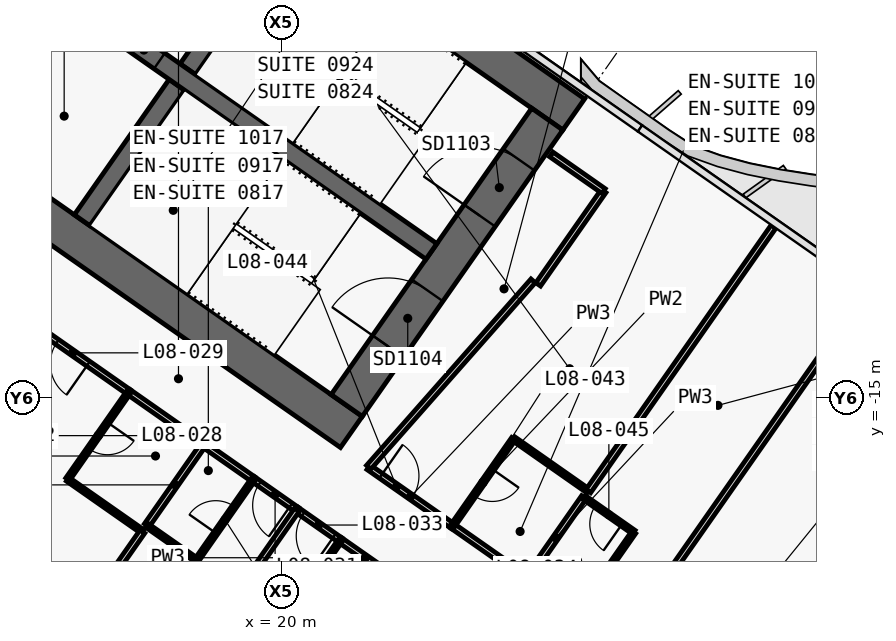
"""IFC4 building model, lengths in metres.
Left out: names, types, materials, properties, quantities, classifications, styles, units other than length and angle.
Written with IfcOpenShell. Run it as: python <this file> out.ifc"""

import sys

from ifc_helpers import new_model, si_unit, direction, frame, frame_2d, origin, place, context, subcontext, project, spatial, polyline, rectangle, outline, extrude, element, fill, save


model = new_model("IFC4")
c1 = context("Model", 3, precision=1e-05, world=origin(), true_north=direction((0.0, 1.0)))
c2 = subcontext(c1, "Body", "Model", "MODEL_VIEW")
j1 = project(units=[si_unit("LENGTHUNIT", "METRE"), si_unit("PLANEANGLEUNIT", "RADIAN")], contexts=[c1])
p1 = place(None, origin())
s1 = spatial("IfcSite", under=j1, at=p1, CompositionType="ELEMENT")
p2 = place(p1, origin())
s2 = spatial("IfcBuilding", under=s1, at=p2, CompositionType="ELEMENT")
p3 = place(p2, frame((0.0, 0.0, 54.5)))
s3 = spatial("IfcBuildingStorey", under=s2, at=p3, CompositionType="ELEMENT", Elevation=54.5)
p4 = place(p3, frame((-0.037, 11.867, 0.0), z_axis=(0.0, 0.0, 1.0), x_axis=(0.819155306259, -0.573571777746, 0.0)))
e1 = element("IfcWall", 1, at=p4, inside=s3, PredefinedType="SHEAR", context=c2, shape_type="SweptSolid", body=[
    extrude(outline(polyline([(33.837, 0.5), (0.0, 0.5), (0.7, -0.5), (33.837, -0.5), (33.837, 0.5)])), origin(), (0.0, 0.0, 1.0), 3.6),
])
p5 = place(p3, frame((-0.037, -0.585, 0.0), z_axis=(0.0, 0.0, 1.0), x_axis=(0.819157152511, -0.573569140985, 0.0)))
e2 = element("IfcWall", 2, at=p5, inside=s3, PredefinedType="SHEAR", context=c2, shape_type="SweptSolid", body=[
    extrude(outline(polyline([(26.695, 0.5), (0.0, 0.5), (0.7, -0.5), (26.695, -0.5), (26.695, 0.5)])), origin(), (0.0, 0.0, 1.0), 3.6),
])
p6 = place(p5, frame((6.695, 0.0, 0.0)))
e3 = element("IfcOpeningElement", 3, at=p6, cuts=e2, PredefinedType="OPENING", context=c2, shape_type="SweptSolid", body=[
    extrude(rectangle(XDim=1.5, YDim=2.1, at=frame_2d((0.75, 1.05))), frame((0.0, 0.51, 0.0), z_axis=(0.0, -1.0, 0.0), x_axis=(1.0, 0.0, 0.0)), (0.0, 0.0, 1.0), 1.02),
])
p7 = place(p5, frame((12.445, 0.0, 0.0)))
e4 = element("IfcOpeningElement", 4, at=p7, cuts=e2, PredefinedType="OPENING", context=c2, shape_type="SweptSolid", body=[
    extrude(rectangle(XDim=1.5, YDim=2.1, at=frame_2d((0.75, 1.05))), frame((0.0, 0.51, 0.0), z_axis=(0.0, -1.0, 0.0), x_axis=(1.0, 0.0, 0.0)), (0.0, 0.0, 1.0), 1.02),
])
p8 = place(p3, frame((21.708, -15.2, 0.0), z_axis=(0.0, 0.0, 1.0), x_axis=(0.573576324356, 0.819152122709, 0.0)))
e5 = element("IfcWall", 5, at=p8, inside=s3, PredefinedType="SHEAR", context=c2, shape_type="SweptSolid", body=[
    extrude(outline(polyline([(9.2, 0.5), (0.0, 0.5), (0.0, -0.5), (9.2, -0.5), (9.2, 0.5)])), origin(), (0.0, 0.0, 1.0), 3.6),
])
p9 = place(p8, frame((6.1, 0.0, 0.0)))
e6 = element("IfcOpeningElement", 6, at=p9, cuts=e5, PredefinedType="OPENING", context=c2, shape_type="SweptSolid", body=[
    extrude(rectangle(XDim=1.8, YDim=2.1, at=frame_2d((0.9, 1.05))), frame((0.0, 0.51, 0.0), z_axis=(0.0, -1.0, 0.0), x_axis=(1.0, 0.0, 0.0)), (0.0, 0.0, 1.0), 1.02),
])
p10 = place(p8, frame((1.9, 0.0, 0.0)))
e7 = element("IfcOpeningElement", 7, at=p10, cuts=e5, PredefinedType="OPENING", context=c2, shape_type="SweptSolid", body=[
    extrude(rectangle(XDim=1.8, YDim=2.1, at=frame_2d((0.9, 1.05))), frame((0.0, 0.51, 0.0), z_axis=(0.0, -1.0, 0.0), x_axis=(1.0, 0.0, 0.0)), (0.0, 0.0, 1.0), 1.02),
])
p11 = place(p3, frame((14.745, -10.324, 0.0), z_axis=(0.0, 0.0, 1.0), x_axis=(0.57356780395, 0.819158088694, 0.0)))
e8 = element("IfcWall", 8, at=p11, inside=s3, PredefinedType="SHEAR", context=c2, shape_type="SweptSolid", body=[
    extrude(outline(polyline([(0.0, 0.25), (0.0, -0.25), (4.35, -0.25), (4.35, 0.25), (0.0, 0.25)])), origin(), (0.0, 0.0, 1.0), 3.6),
])
p12 = place(p3, frame((17.527, -6.352, 0.0), z_axis=(0.0, 0.0, 1.0), x_axis=(0.573530143085, 0.819184457233, 0.0)))
e9 = element("IfcWall", 9, at=p12, inside=s3, PredefinedType="SHEAR", context=c2, shape_type="SweptSolid", body=[
    extrude(outline(polyline([(4.35, -0.25), (4.35, 0.25), (0.0, 0.25), (0.0, -0.25), (4.35, -0.25)])), origin(), (0.0, 0.0, 1.0), 3.6),
])
p13 = place(p3, frame((2.638, 3.768, 0.0), z_axis=(0.0, 0.0, 1.0), x_axis=(0.819148977158, -0.573580816643, 0.0)))
e10 = element("IfcWall", 10, at=p13, inside=s3, PredefinedType="SHEAR", context=c2, shape_type="SweptSolid", body=[
    extrude(outline(polyline([(0.0, 0.25), (0.0, -0.25), (26.0, -0.25), (26.0, 0.25), (0.0, 0.25)])), origin(), (0.0, 0.0, 1.0), 3.6),
])
p14 = place(p13, frame((9.637, 0.0, 0.0)))
e11 = element("IfcOpeningElement", 11, at=p14, cuts=e10, PredefinedType="OPENING", context=c2, shape_type="SweptSolid", body=[
    extrude(rectangle(XDim=1.2, YDim=2.1, at=frame_2d((0.6, 1.05))), frame((0.0, 0.26, 0.0), z_axis=(0.0, -1.0, 0.0), x_axis=(1.0, 0.0, 0.0)), (0.0, 0.0, 1.0), 0.52),
])
p15 = place(p13, frame((11.812, 0.0, 0.0)))
e12 = element("IfcOpeningElement", 12, at=p15, cuts=e10, PredefinedType="OPENING", context=c2, shape_type="SweptSolid", body=[
    extrude(rectangle(XDim=1.2, YDim=2.1, at=frame_2d((0.6, 1.05))), frame((0.0, 0.26, 0.0), z_axis=(0.0, -1.0, 0.0), x_axis=(1.0, 0.0, 0.0)), (0.0, 0.0, 1.0), 0.52),
])
p16 = place(p13, frame((13.988, 0.0, 0.0)))
e13 = element("IfcOpeningElement", 13, at=p16, cuts=e10, PredefinedType="OPENING", context=c2, shape_type="SweptSolid", body=[
    extrude(rectangle(XDim=1.2, YDim=2.1, at=frame_2d((0.6, 1.05))), frame((0.0, 0.26, 0.0), z_axis=(0.0, -1.0, 0.0), x_axis=(1.0, 0.0, 0.0)), (0.0, 0.0, 1.0), 0.52),
])
p17 = place(p13, frame((16.262, 0.0, 0.0)))
e14 = element("IfcOpeningElement", 14, at=p17, cuts=e10, PredefinedType="OPENING", context=c2, shape_type="SweptSolid", body=[
    extrude(rectangle(XDim=1.0, YDim=2.1, at=frame_2d((0.5, 1.05))), frame((0.0, 0.26, 0.0), z_axis=(0.0, -1.0, 0.0), x_axis=(1.0, 0.0, 0.0)), (0.0, 0.0, 1.0), 0.52),
])
p18 = place(p3, frame((22.284, -16.824, 0.0), z_axis=(0.0, 0.0, 1.0), x_axis=(0.819176640776, -0.573541307325, 0.0)))
e15 = element("IfcWall", 15, at=p18, inside=s3, PredefinedType="PARTITIONING", context=c2, shape_type="SweptSolid", body=[
    extrude(rectangle(XDim=2.698, YDim=0.15, at=frame_2d((1.349, 0.0))), origin(), (0.0, 0.0, 1.0), 3.32),
])
p19 = place(p18, frame((0.396, 0.0, 0.0)))
e16 = element("IfcOpeningElement", 16, at=p19, cuts=e15, PredefinedType="OPENING", context=c2, shape_type="SweptSolid", body=[
    extrude(rectangle(XDim=1.0, YDim=2.1, at=frame_2d((0.5, 1.05))), frame((0.0, 0.085, 0.0), z_axis=(0.0, -1.0, 0.0), x_axis=(1.0, 0.0, 0.0)), (0.0, 0.0, 1.0), 0.17),
])
p20 = place(p3, frame((24.491, -18.369, 0.0), z_axis=(0.0, 0.0, 1.0), x_axis=(0.819179439794, -0.573537309527, 0.0)))
e17 = element("IfcWall", 17, at=p20, inside=s3, PredefinedType="PARTITIONING", context=c2, shape_type="SweptSolid", body=[
    extrude(rectangle(XDim=2.404, YDim=0.15, at=frame_2d((1.202, 0.0))), origin(), (0.0, 0.0, 1.0), 3.32),
])
p21 = place(p3, frame((15.974, -14.847, 0.0), z_axis=(0.0, 0.0, 1.0), x_axis=(-0.819145961204, 0.573585123798, 0.0)))
e18 = element("IfcWall", 18, at=p21, inside=s3, PredefinedType="PARTITIONING", context=c2, shape_type="SweptSolid", body=[
    extrude(rectangle(XDim=3.603, YDim=0.15, at=frame_2d((1.802, 0.0))), origin(), (0.0, 0.0, 1.0), 2.6),
])
p22 = place(p21, frame((1.301, 0.0, 0.0)))
e19 = element("IfcOpeningElement", 19, at=p22, cuts=e18, PredefinedType="OPENING", context=c2, shape_type="SweptSolid", body=[
    extrude(rectangle(XDim=1.0, YDim=2.1, at=frame_2d((0.5, 1.05))), frame((0.0, 0.085, 0.0), z_axis=(0.0, -1.0, 0.0), x_axis=(1.0, 0.0, 0.0)), (0.0, 0.0, 1.0), 0.17),
])
p23 = place(p3, frame((17.941, -16.224, 0.0), z_axis=(0.0, 0.0, 1.0), x_axis=(-0.81922714955, 0.573469159974, 0.0)))
e20 = element("IfcWall", 20, at=p23, inside=s3, PredefinedType="PARTITIONING", context=c2, shape_type="SweptSolid", body=[
    extrude(rectangle(XDim=2.404, YDim=0.15, at=frame_2d((1.202, 0.0))), origin(), (0.0, 0.0, 1.0), 3.32),
])
p24 = place(p3, frame((20.398, -17.945, 0.0), z_axis=(0.0, 0.0, 1.0), x_axis=(-0.819060210533, 0.573707566205, 0.0)))
e21 = element("IfcWall", 21, at=p24, inside=s3, PredefinedType="PARTITIONING", context=c2, shape_type="SweptSolid", body=[
    extrude(rectangle(XDim=1.403, YDim=0.15, at=frame_2d((0.702, 0.0))), origin(), (0.0, 0.0, 1.0), 2.6),
])
p25 = place(p24, frame((0.202, 0.0, 0.0)))
e22 = element("IfcOpeningElement", 22, at=p25, cuts=e21, PredefinedType="OPENING", context=c2, shape_type="SweptSolid", body=[
    extrude(rectangle(XDim=1.0, YDim=2.1, at=frame_2d((0.5, 1.05))), frame((0.0, 0.085, 0.0), z_axis=(0.0, -1.0, 0.0), x_axis=(1.0, 0.0, 0.0)), (0.0, 0.0, 1.0), 0.17),
])
p26 = place(p3, frame((19.251, -17.142, 0.0), z_axis=(0.0, 0.0, 1.0), x_axis=(-0.819189013667, 0.573523634986, 0.0)))
e23 = element("IfcWall", 23, at=p26, inside=s3, PredefinedType="PARTITIONING", context=c2, shape_type="SweptSolid", body=[
    extrude(rectangle(XDim=1.604, YDim=0.15, at=frame_2d((0.802, 0.0))), origin(), (0.0, 0.0, 1.0), 3.32),
])
p27 = place(p3, frame((21.544, -18.748, 0.0), z_axis=(0.0, 0.0, 1.0), x_axis=(-0.81914197737, 0.573590813132, 0.0)))
e24 = element("IfcWall", 24, at=p27, inside=s3, PredefinedType="PARTITIONING", context=c2, shape_type="SweptSolid", body=[
    extrude(rectangle(XDim=1.403, YDim=0.15, at=frame_2d((0.701, 0.0))), origin(), (0.0, 0.0, 1.0), 2.6),
])
p28 = place(p27, frame((0.201, 0.0, 0.0)))
e25 = element("IfcOpeningElement", 25, at=p28, cuts=e24, PredefinedType="OPENING", context=c2, shape_type="SweptSolid", body=[
    extrude(rectangle(XDim=1.0, YDim=2.1, at=frame_2d((0.5, 1.05))), frame((0.0, 0.085, 0.0), z_axis=(0.0, -1.0, 0.0), x_axis=(1.0, 0.0, 0.0)), (0.0, 0.0, 1.0), 0.17),
])
p29 = place(p3, frame((22.855, -19.666, 0.0), z_axis=(0.0, 0.0, 1.0), x_axis=(-0.819117502046, 0.573625764625, 0.0)))
e26 = element("IfcWall", 26, at=p29, inside=s3, PredefinedType="PARTITIONING", context=c2, shape_type="SweptSolid", body=[
    extrude(rectangle(XDim=1.604, YDim=0.15, at=frame_2d((0.802, 0.0))), origin(), (0.0, 0.0, 1.0), 3.32),
])
p30 = place(p3, frame((26.098, -16.076, 0.0), z_axis=(0.0, 0.0, 1.0), x_axis=(-0.573550118428, -0.819170471667, 0.0)))
e27 = element("IfcWall", 27, at=p30, inside=s3, PredefinedType="PARTITIONING", context=c2, shape_type="SweptSolid", body=[
    extrude(rectangle(XDim=2.8, YDim=0.12, at=frame_2d((1.4, 0.0))), origin(), (0.0, 0.0, 1.0), 2.6),
])
p31 = place(p30, frame((0.975, 0.0, 0.0)))
e28 = element("IfcOpeningElement", 28, at=p31, cuts=e27, PredefinedType="OPENING", context=c2, shape_type="SweptSolid", body=[
    extrude(rectangle(XDim=0.85, YDim=2.05, at=frame_2d((0.425, 1.025))), frame((0.0, 0.07, 0.0), z_axis=(0.0, -1.0, 0.0), x_axis=(1.0, 0.0, 0.0)), (0.0, 0.0, 1.0), 0.14),
])
p32 = place(p3, frame((28.065, -17.453, 0.0), z_axis=(0.0, 0.0, 1.0), x_axis=(-0.819155442668, 0.573571582932, 0.0)))
e29 = element("IfcWall", 29, at=p32, inside=s3, PredefinedType="PARTITIONING", context=c2, shape_type="SweptSolid", body=[
    extrude(rectangle(XDim=2.4, YDim=0.12, at=frame_2d((1.2, 0.0))), origin(), (0.0, 0.0, 1.0), 3.32),
])
p33 = place(p3, frame((32.94, -10.491, 0.0), z_axis=(0.0, 0.0, 1.0), x_axis=(-0.573593433868, -0.819140142237, 0.0)))
e30 = element("IfcWall", 30, at=p33, inside=s3, PredefinedType="PARTITIONING", context=c2, shape_type="SweptSolid", body=[
    extrude(rectangle(XDim=8.499, YDim=0.15, at=frame_2d((4.25, 0.0))), origin(), (0.0, 0.0, 1.0), 2.6),
])
p34 = place(p3, frame((22.285, -16.825, 0.0), z_axis=(0.0, 0.0, 1.0), x_axis=(0.661551268245, 0.749899939647, 0.0)))
e31 = element("IfcWall", 31, at=p34, inside=s3, PredefinedType="PARTITIONING", context=c2, shape_type="SweptSolid", body=[
    extrude(rectangle(XDim=6.541, YDim=0.15, at=frame_2d((3.271, 0.0))), origin(), (0.0, 0.0, 1.0), 2.6),
])
p35 = place(p3, frame((26.746, -12.014, 0.0), z_axis=(0.0, 0.0, 1.0), x_axis=(0.573560650686, 0.819163097304, 0.0)))
e32 = element("IfcWall", 32, at=p35, inside=s3, PredefinedType="PARTITIONING", context=c2, shape_type="SweptSolid", body=[
    extrude(rectangle(XDim=3.0, YDim=0.15, at=frame_2d((1.5, 0.0))), origin(), (0.0, 0.0, 1.0), 3.32),
])
p36 = place(p3, frame((28.467, -9.556, 0.0), z_axis=(0.0, 0.0, 1.0), x_axis=(-0.819109000826, 0.573637903879, 0.0)))
e33 = element("IfcWall", 33, at=p36, inside=s3, PredefinedType="PARTITIONING", context=c2, shape_type="SweptSolid", body=[
    extrude(rectangle(XDim=1.68, YDim=0.15, at=frame_2d((0.84, 0.0))), origin(), (0.0, 0.0, 1.0), 3.32),
])
p37 = place(p3, frame((27.951, -17.616, 0.0), z_axis=(0.0, 0.0, 1.0), x_axis=(-0.573544201094, -0.819174614714, 0.0)))
e34 = element("IfcWall", 34, at=p37, inside=s3, PredefinedType="PARTITIONING", context=c2, shape_type="SweptSolid", body=[
    extrude(rectangle(XDim=2.602, YDim=0.15, at=frame_2d((1.301, 0.0))), origin(), (0.0, 0.0, 1.0), 2.6),
])
p38 = place(p3, frame((27.77, -20.666, 0.0), z_axis=(0.0, 0.0, 1.0), x_axis=(0.573537965655, 0.819178980414, 0.0)))
e35 = element("IfcWall", 35, at=p38, inside=s3, PredefinedType="PARTITIONING", context=c2, shape_type="SweptSolid", body=[
    extrude(rectangle(XDim=2.6, YDim=0.12, at=frame_2d((1.3, 0.0))), origin(), (0.0, 0.0, 1.0), 2.6),
])
p39 = place(p3, frame((29.261, -18.534, 0.0), z_axis=(0.0, 0.0, 1.0), x_axis=(-0.819253425856, 0.573431621227, 0.0)))
e36 = element("IfcWall", 36, at=p39, inside=s3, PredefinedType="PARTITIONING", context=c2, shape_type="SweptSolid", body=[
    extrude(rectangle(XDim=1.6, YDim=0.12, at=frame_2d((0.8, 0.0))), origin(), (0.0, 0.0, 1.0), 3.32),
])
p40 = place(p39, frame((0.375, 0.0, 0.0)))
e37 = element("IfcOpeningElement", 37, at=p40, cuts=e36, PredefinedType="OPENING", context=c2, shape_type="SweptSolid", body=[
    extrude(rectangle(XDim=0.85, YDim=2.05, at=frame_2d((0.425, 1.025))), frame((0.0, 0.07, 0.0), z_axis=(0.0, -1.0, 0.0), x_axis=(1.0, 0.0, 0.0)), (0.0, 0.0, 1.0), 0.14),
])
p41 = place(p3, frame((35.013, -12.76, 0.0), z_axis=(0.0, 0.0, 1.0), x_axis=(-0.573558725113, -0.819164445546, 0.0)))
e38 = element("IfcWall", 38, at=p41, inside=s3, PredefinedType="PARTITIONING", context=c2, shape_type="SweptSolid", body=[
    extrude(rectangle(XDim=9.01, YDim=0.15, at=frame_2d((4.505, 0.0))), origin(), (0.0, 0.0, 1.0), 2.6),
])
p42 = place(p3, frame((15.972, -14.846, 0.0), z_axis=(0.0, 0.0, 1.0), x_axis=(-0.573550118428, -0.819170471667, 0.0)))
e39 = element("IfcWall", 39, at=p42, inside=s3, PredefinedType="PARTITIONING", context=c2, shape_type="SweptSolid", body=[
    extrude(rectangle(XDim=2.8, YDim=0.12, at=frame_2d((1.4, 0.0))), origin(), (0.0, 0.0, 1.0), 3.32),
])
p43 = place(p42, frame((0.975, 0.0, 0.0)))
e40 = element("IfcOpeningElement", 40, at=p43, cuts=e39, PredefinedType="OPENING", context=c2, shape_type="SweptSolid", body=[
    extrude(rectangle(XDim=0.85, YDim=2.05, at=frame_2d((0.425, 1.025))), frame((0.0, 0.07, 0.0), z_axis=(0.0, -1.0, 0.0), x_axis=(1.0, 0.0, 0.0)), (0.0, 0.0, 1.0), 0.14),
])
p44 = place(p3, frame((14.366, -17.141, 0.0), z_axis=(0.0, 0.0, 1.0), x_axis=(0.819155442668, -0.573571582932, 0.0)))
e41 = element("IfcWall", 41, at=p44, inside=s3, PredefinedType="PARTITIONING", context=c2, shape_type="SweptSolid", body=[
    extrude(rectangle(XDim=2.4, YDim=0.12, at=frame_2d((1.2, 0.0))), origin(), (0.0, 0.0, 1.0), 3.32),
])
p45 = place(p3, frame((16.332, -18.518, 0.0), z_axis=(0.0, 0.0, 1.0), x_axis=(-0.573564311442, -0.819160534108, 0.0)))
e42 = element("IfcWall", 42, at=p45, inside=s3, PredefinedType="PARTITIONING", context=c2, shape_type="SweptSolid", body=[
    extrude(rectangle(XDim=4.499, YDim=0.15, at=frame_2d((2.25, 0.0))), origin(), (0.0, 0.0, 1.0), 2.5),
])
p46 = place(p3, frame((17.939, -16.223, 0.0), z_axis=(0.0, 0.0, 1.0), x_axis=(-0.573588285102, -0.819143747577, 0.0)))
e43 = element("IfcWall", 43, at=p46, inside=s3, PredefinedType="PARTITIONING", context=c2, shape_type="SweptSolid", body=[
    extrude(rectangle(XDim=2.602, YDim=0.15, at=frame_2d((1.301, 0.0))), origin(), (0.0, 0.0, 1.0), 3.32),
])
p47 = place(p3, frame((16.447, -18.354, 0.0), z_axis=(0.0, 0.0, 1.0), x_axis=(0.819253425856, -0.573431621227, 0.0)))
e44 = element("IfcWall", 44, at=p47, inside=s3, PredefinedType="PARTITIONING", context=c2, shape_type="SweptSolid", body=[
    extrude(rectangle(XDim=1.6, YDim=0.12, at=frame_2d((0.8, 0.0))), origin(), (0.0, 0.0, 1.0), 3.32),
])
p48 = place(p3, frame((17.759, -19.271, 0.0), z_axis=(0.0, 0.0, 1.0), x_axis=(0.573600972199, 0.819134863556, 0.0)))
e45 = element("IfcWall", 45, at=p48, inside=s3, PredefinedType="PARTITIONING", context=c2, shape_type="SweptSolid", body=[
    extrude(rectangle(XDim=2.6, YDim=0.12, at=frame_2d((1.3, 0.0))), origin(), (0.0, 0.0, 1.0), 3.32),
])
p49 = place(p48, frame((0.875, 0.0, 0.0)))
e46 = element("IfcOpeningElement", 46, at=p49, cuts=e45, PredefinedType="OPENING", context=c2, shape_type="SweptSolid", body=[
    extrude(rectangle(XDim=0.85, YDim=2.05, at=frame_2d((0.425, 1.025))), frame((0.0, 0.07, 0.0), z_axis=(0.0, -1.0, 0.0), x_axis=(1.0, 0.0, 0.0)), (0.0, 0.0, 1.0), 0.14),
])
p50 = place(p3, frame((20.396, -17.944, 0.0), z_axis=(0.0, 0.0, 1.0), x_axis=(-0.57359826181, -0.819136761505, 0.0)))
e47 = element("IfcWall", 47, at=p50, inside=s3, PredefinedType="PARTITIONING", context=c2, shape_type="SweptSolid", body=[
    extrude(rectangle(XDim=6.63, YDim=0.15, at=frame_2d((3.315, 0.0))), origin(), (0.0, 0.0, 1.0), 2.6),
])
p51 = place(p3, frame((21.542, -18.747, 0.0), z_axis=(0.0, 0.0, 1.0), x_axis=(-0.573645091666, -0.819103967032, 0.0)))
e48 = element("IfcWall", 48, at=p51, inside=s3, PredefinedType="PARTITIONING", context=c2, shape_type="SweptSolid", body=[
    extrude(rectangle(XDim=2.6, YDim=0.12, at=frame_2d((1.3, 0.0))), origin(), (0.0, 0.0, 1.0), 3.32),
])
p52 = place(p51, frame((0.875, 0.0, 0.0)))
e49 = element("IfcOpeningElement", 49, at=p52, cuts=e48, PredefinedType="OPENING", context=c2, shape_type="SweptSolid", body=[
    extrude(rectangle(XDim=0.85, YDim=2.05, at=frame_2d((0.425, 1.025))), frame((0.0, 0.07, 0.0), z_axis=(0.0, -1.0, 0.0), x_axis=(1.0, 0.0, 0.0)), (0.0, 0.0, 1.0), 0.14),
])
p53 = place(p17, origin())
e50 = element("IfcDoor", 50, at=p53, inside=s3, OperationType="SINGLE_SWING_RIGHT", PredefinedType="DOOR", context=c2, shape_type="SweptSolid", body=[
    extrude(rectangle(XDim=1.0, YDim=2.1, at=frame_2d((0.5, 1.05))), frame((0.0, 0.025, 0.0), z_axis=(0.0, -1.0, 0.0), x_axis=(1.0, 0.0, 0.0)), (0.0, 0.0, 1.0), 0.05),
])
fill(e14, e50)
p54 = place(p9, origin())
e51 = element("IfcDoor", 51, at=p54, inside=s3, OperationType="DOUBLE_DOOR_SINGLE_SWING", PredefinedType="DOOR", context=c2, shape_type="SweptSolid", body=[
    extrude(rectangle(XDim=1.8, YDim=2.1, at=frame_2d((0.9, 1.05))), frame((0.0, 0.025, 0.0), z_axis=(0.0, -1.0, 0.0), x_axis=(1.0, 0.0, 0.0)), (0.0, 0.0, 1.0), 0.05),
])
fill(e6, e51)
p55 = place(p10, origin())
e52 = element("IfcDoor", 52, at=p55, inside=s3, OperationType="DOUBLE_DOOR_SINGLE_SWING", PredefinedType="DOOR", context=c2, shape_type="SweptSolid", body=[
    extrude(rectangle(XDim=1.8, YDim=2.1, at=frame_2d((0.9, 1.05))), frame((0.0, 0.025, 0.0), z_axis=(0.0, -1.0, 0.0), x_axis=(1.0, 0.0, 0.0)), (0.0, 0.0, 1.0), 0.05),
])
fill(e7, e52)
p56 = place(p43, origin())
e53 = element("IfcDoor", 53, at=p56, inside=s3, OperationType="SINGLE_SWING_RIGHT", PredefinedType="DOOR", context=c2, shape_type="SweptSolid", body=[
    extrude(rectangle(XDim=0.85, YDim=2.05, at=frame_2d((0.425, 1.025))), frame((0.0, 0.025, 0.0), z_axis=(0.0, -1.0, 0.0), x_axis=(1.0, 0.0, 0.0)), (0.0, 0.0, 1.0), 0.05),
])
fill(e40, e53)
p57 = place(p22, origin())
e54 = element("IfcDoor", 54, at=p57, inside=s3, OperationType="SINGLE_SWING_LEFT", PredefinedType="DOOR", context=c2, shape_type="SweptSolid", body=[
    extrude(rectangle(XDim=1.0, YDim=2.1, at=frame_2d((0.5, 1.05))), frame((0.0, 0.025, 0.0), z_axis=(0.0, -1.0, 0.0), x_axis=(1.0, 0.0, 0.0)), (0.0, 0.0, 1.0), 0.05),
])
fill(e19, e54)
p58 = place(p49, origin())
e55 = element("IfcDoor", 55, at=p58, inside=s3, OperationType="SINGLE_SWING_LEFT", PredefinedType="DOOR", context=c2, shape_type="SweptSolid", body=[
    extrude(rectangle(XDim=0.85, YDim=2.05, at=frame_2d((0.425, 1.025))), frame((0.0, 0.025, 0.0), z_axis=(0.0, -1.0, 0.0), x_axis=(1.0, 0.0, 0.0)), (0.0, 0.0, 1.0), 0.05),
])
fill(e46, e55)
p59 = place(p25, origin())
e56 = element("IfcDoor", 56, at=p59, inside=s3, OperationType="SINGLE_SWING_RIGHT", PredefinedType="DOOR", context=c2, shape_type="SweptSolid", body=[
    extrude(rectangle(XDim=1.0, YDim=2.1, at=frame_2d((0.5, 1.05))), frame((0.0, 0.025, 0.0), z_axis=(0.0, -1.0, 0.0), x_axis=(1.0, 0.0, 0.0)), (0.0, 0.0, 1.0), 0.05),
])
fill(e22, e56)
p60 = place(p28, origin())
e57 = element("IfcDoor", 57, at=p60, inside=s3, OperationType="SINGLE_SWING_RIGHT", PredefinedType="DOOR", context=c2, shape_type="SweptSolid", body=[
    extrude(rectangle(XDim=1.0, YDim=2.1, at=frame_2d((0.5, 1.05))), frame((0.0, 0.025, 0.0), z_axis=(0.0, -1.0, 0.0), x_axis=(1.0, 0.0, 0.0)), (0.0, 0.0, 1.0), 0.05),
])
fill(e25, e57)
p61 = place(p31, origin())
e58 = element("IfcDoor", 58, at=p61, inside=s3, OperationType="SINGLE_SWING_LEFT", PredefinedType="DOOR", context=c2, shape_type="SweptSolid", body=[
    extrude(rectangle(XDim=0.85, YDim=2.05, at=frame_2d((0.425, 1.025))), frame((0.0, 0.025, 0.0), z_axis=(0.0, -1.0, 0.0), x_axis=(1.0, 0.0, 0.0)), (0.0, 0.0, 1.0), 0.05),
])
fill(e28, e58)
p62 = place(p19, origin())
e59 = element("IfcDoor", 59, at=p62, inside=s3, OperationType="SINGLE_SWING_RIGHT", PredefinedType="DOOR", context=c2, shape_type="SweptSolid", body=[
    extrude(rectangle(XDim=1.0, YDim=2.1, at=frame_2d((0.5, 1.05))), frame((0.0, 0.025, 0.0), z_axis=(0.0, -1.0, 0.0), x_axis=(1.0, 0.0, 0.0)), (0.0, 0.0, 1.0), 0.05),
])
fill(e16, e59)
p63 = place(p40, origin())
e60 = element("IfcDoor", 60, at=p63, inside=s3, OperationType="SINGLE_SWING_LEFT", PredefinedType="DOOR", context=c2, shape_type="SweptSolid", body=[
    extrude(rectangle(XDim=0.85, YDim=2.05, at=frame_2d((0.425, 1.025))), frame((0.0, 0.025, 0.0), z_axis=(0.0, -1.0, 0.0), x_axis=(1.0, 0.0, 0.0)), (0.0, 0.0, 1.0), 0.05),
])
fill(e37, e60)
save(model, sys.argv[1])
